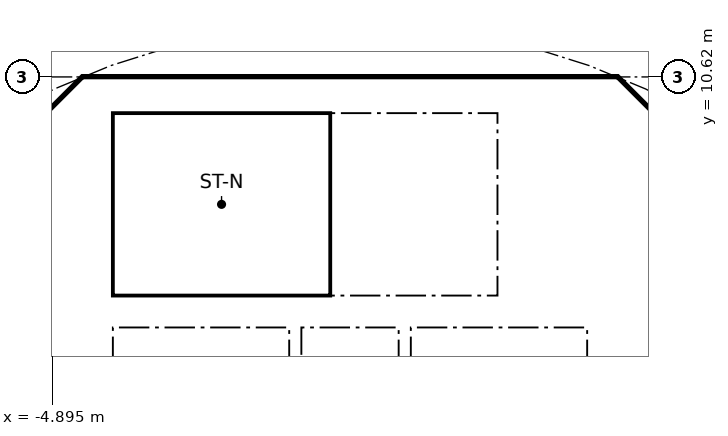
"""IFC4 building model, lengths in metres.
Left out: names, types, materials, properties, quantities, classifications, styles, units other than length and angle.
Written with IfcOpenShell. Run it as: python <this file> out.ifc"""

import sys

from ifc_helpers import new_model, si_unit, direction, frame, frame_2d, origin, place, context, subcontext, project, spatial, polyline, rectangle, outline, extrude, element, fill, save


model = new_model("IFC4")
c1 = context("Model", 3, precision=1e-05, world=origin(), true_north=direction((0.0, 1.0)))
c2 = subcontext(c1, "Body", "Model", "MODEL_VIEW")
j1 = project(units=[si_unit("LENGTHUNIT", "METRE"), si_unit("PLANEANGLEUNIT", "RADIAN")], contexts=[c1])
p1 = place(None, origin())
s1 = spatial("IfcSite", under=j1, at=p1, CompositionType="ELEMENT")
p2 = place(p1, origin())
s2 = spatial("IfcBuilding", under=s1, at=p2, CompositionType="ELEMENT")
p3 = place(p2, frame((0.0, 0.0, 191.8)))
s3 = spatial("IfcBuildingStorey", under=s2, at=p3, CompositionType="ELEMENT", Elevation=191.8)
p4 = place(p3, frame((9.988, 4.613, 0.0), z_axis=(0.0, 0.0, 1.0), x_axis=(-0.707106781187, 0.707106781187, 0.0)))
e1 = element("IfcWall", 1, at=p4, inside=s3, PredefinedType="SHEAR", context=c2, shape_type="SweptSolid", body=[
    extrude(rectangle(XDim=7.602, YDim=0.6, at=frame_2d((3.801, 0.0))), origin(), (0.0, 0.0, 1.0), 3.44),
])
p5 = place(p4, frame((3.201, 0.0, 0.0)))
e2 = element("IfcOpeningElement", 2, at=p5, cuts=e1, PredefinedType="OPENING", context=c2, shape_type="SweptSolid", body=[
    extrude(rectangle(XDim=1.2, YDim=2.1, at=frame_2d((0.6, 1.05))), frame((0.0, 0.31, 0.0), z_axis=(0.0, -1.0, 0.0), x_axis=(1.0, 0.0, 0.0)), (0.0, 0.0, 1.0), 0.62),
])
p6 = place(p3, frame((-4.613, 9.988, 0.0), z_axis=(0.0, 0.0, 1.0), x_axis=(-0.707106781187, -0.707106781187, 0.0)))
e3 = element("IfcWall", 3, at=p6, inside=s3, PredefinedType="SHEAR", context=c2, shape_type="SweptSolid", body=[
    extrude(rectangle(XDim=7.602, YDim=0.6, at=frame_2d((3.801, 0.0))), origin(), (0.0, 0.0, 1.0), 3.44),
])
p7 = place(p6, frame((0.351, 0.0, 0.0)))
e4 = element("IfcOpeningElement", 4, at=p7, cuts=e3, PredefinedType="OPENING", context=c2, shape_type="SweptSolid", body=[
    extrude(rectangle(XDim=1.1, YDim=2.1, at=frame_2d((0.55, 1.05))), frame((0.0, 0.31, 0.0), z_axis=(0.0, -1.0, 0.0), x_axis=(1.0, 0.0, 0.0)), (0.0, 0.0, 1.0), 0.62),
])
p8 = place(p3, frame((4.0, 4.3, 0.0), z_axis=(0.0, 0.0, 1.0), x_axis=(0.0, 1.0, 0.0)))
e5 = element("IfcWall", 5, at=p8, inside=s3, PredefinedType="SOLIDWALL", context=c2, shape_type="SweptSolid", body=[
    extrude(rectangle(XDim=2.2, YDim=0.2, at=frame_2d((1.1, 0.0))), origin(), (0.0, 0.0, 1.0), 3.44),
])
p9 = place(p8, frame((0.55, 0.0, 0.0)))
e6 = element("IfcOpeningElement", 6, at=p9, cuts=e5, PredefinedType="OPENING", context=c2, shape_type="SweptSolid", body=[
    extrude(rectangle(XDim=1.1, YDim=2.1, at=frame_2d((0.55, 1.05))), frame((0.0, 0.11, 0.0), z_axis=(0.0, -1.0, 0.0), x_axis=(1.0, 0.0, 0.0)), (0.0, 0.0, 1.0), 0.22),
])
p10 = place(p3, frame((-4.0, 4.3, 0.0), z_axis=(0.0, 0.0, 1.0), x_axis=(0.0, 1.0, 0.0)))
e7 = element("IfcWall", 7, at=p10, inside=s3, PredefinedType="SOLIDWALL", context=c2, shape_type="SweptSolid", body=[
    extrude(rectangle(XDim=2.2, YDim=0.2, at=frame_2d((1.1, 0.0))), origin(), (0.0, 0.0, 1.0), 3.44),
])
p11 = place(p10, frame((0.55, 0.0, 0.0)))
e8 = element("IfcOpeningElement", 8, at=p11, cuts=e7, PredefinedType="OPENING", context=c2, shape_type="SweptSolid", body=[
    extrude(rectangle(XDim=1.1, YDim=2.1, at=frame_2d((0.55, 1.05))), frame((0.0, 0.11, 0.0), z_axis=(0.0, -1.0, 0.0), x_axis=(1.0, 0.0, 0.0)), (0.0, 0.0, 1.0), 0.22),
])
p12 = place(p3, frame((4.0, 7.025, 0.0), z_axis=(0.0, 0.0, 1.0), x_axis=(0.0, 1.0, 0.0)))
e9 = element("IfcWall", 9, at=p12, inside=s3, PredefinedType="SOLIDWALL", context=c2, shape_type="SweptSolid", body=[
    extrude(rectangle(XDim=3.0, YDim=0.2, at=frame_2d((1.5, 0.0))), origin(), (0.0, 0.0, 1.0), 3.44),
])
p13 = place(p12, frame((0.925, 0.0, 0.0)))
e10 = element("IfcOpeningElement", 10, at=p13, cuts=e9, PredefinedType="OPENING", context=c2, shape_type="SweptSolid", body=[
    extrude(rectangle(XDim=1.1, YDim=2.1, at=frame_2d((0.55, 1.05))), frame((0.0, 0.11, 0.0), z_axis=(0.0, -1.0, 0.0), x_axis=(1.0, 0.0, 0.0)), (0.0, 0.0, 1.0), 0.22),
])
p14 = place(p3, origin())
e11 = element("IfcWall", 11, at=p14, inside=s3, PredefinedType="SHEAR", context=c2, shape_type="SweptSolid", body=[
    extrude(outline(polyline([(-4.152, 10.025), (-4.401, 9.776), (-4.825, 10.2), (-4.401, 10.625), (4.401, 10.625), (4.825, 10.2), (4.401, 9.776), (4.152, 10.025), (-4.152, 10.025)])), origin(), (0.0, 0.0, 1.0), 3.44),
])
for number, where, z_axis, x_axis in (
    (12, (-0.9, 4.3, 0.0), (0.0, 0.0, 1.0), (0.0, 1.0, 0.0)),
    (13, (0.9, 4.3, 0.0), (0.0, 0.0, 1.0), (0.0, 1.0, 0.0)),
):
    element("IfcWall", number, at=place(p3, frame(where, z_axis=z_axis, x_axis=x_axis)), inside=s3, PredefinedType="SOLIDWALL", context=c2, shape_type="SweptSolid", body=[
        extrude(rectangle(XDim=2.2, YDim=0.2, at=frame_2d((1.1, 0.0))), origin(), (0.0, 0.0, 1.0), 3.44),
    ])
p15 = place(p3, origin())
e14 = element("IfcWall", 14, at=p15, inside=s3, PredefinedType="SOLIDWALL", context=c2, shape_type="SweptSolid", body=[
    extrude(outline(polyline([(-3.9, 7.025), (-4.1, 7.025), (-4.1, 10.025), (-3.9, 10.025), (-3.9, 7.025)])), origin(), (0.0, 0.0, 1.0), 3.44),
])
p16 = place(p3, origin())
e15 = element("IfcWall", 15, at=p16, inside=s3, PredefinedType="SOLIDWALL", context=c2, shape_type="SweptSolid", body=[
    extrude(outline(polyline([(4.1, 6.5), (-4.1, 6.5), (-4.1, 7.025), (4.1, 7.025), (4.1, 6.5)])), origin(), (0.0, 0.0, 1.0), 3.44),
])
p17 = place(p13, origin())
e16 = element("IfcDoor", 16, at=p17, inside=s3, OperationType="SINGLE_SWING_LEFT", PredefinedType="DOOR", context=c2, shape_type="SweptSolid", body=[
    extrude(rectangle(XDim=1.1, YDim=2.1, at=frame_2d((0.55, 1.05))), frame((0.0, 0.025, 0.0), z_axis=(0.0, -1.0, 0.0), x_axis=(1.0, 0.0, 0.0)), (0.0, 0.0, 1.0), 0.05),
])
fill(e10, e16)
p18 = place(p7, origin())
e17 = element("IfcDoor", 17, at=p18, inside=s3, OperationType="SINGLE_SWING_RIGHT", PredefinedType="DOOR", context=c2, shape_type="SweptSolid", body=[
    extrude(rectangle(XDim=1.1, YDim=2.1, at=frame_2d((0.55, 1.05))), frame((0.0, 0.025, 0.0), z_axis=(0.0, -1.0, 0.0), x_axis=(1.0, 0.0, 0.0)), (0.0, 0.0, 1.0), 0.05),
])
fill(e4, e17)
save(model, sys.argv[1])
